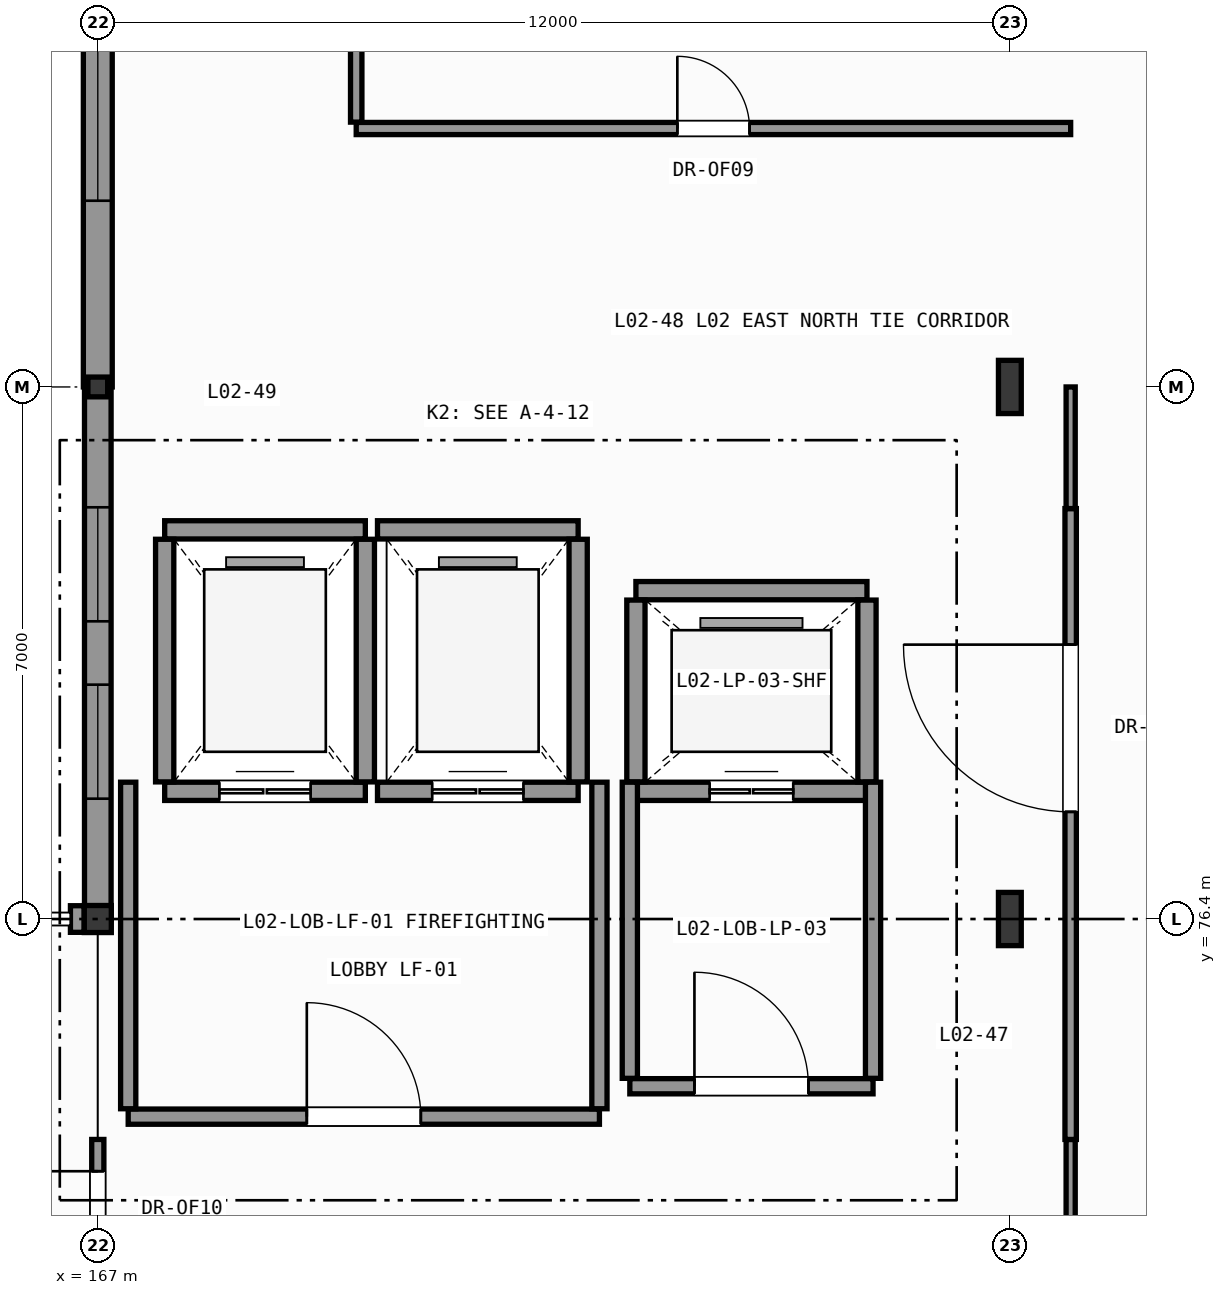
"""IFC4 building model, lengths in metres.
Left out: names, types, materials, properties, quantities, classifications, styles, units other than length and angle.
Written with IfcOpenShell. Run it as: python <this file> out.ifc"""

import sys

from ifc_helpers import new_model, si_unit, direction, frame, frame_2d, origin, origin_2d, place, context, subcontext, project, spatial, rectangle, hollow_rectangle, hollow_circle, i_section, extrude, element, fill, save


model = new_model("IFC4")
c1 = context("Model", 3, precision=1e-05, world=origin(), true_north=direction((0.0, 1.0)))
c2 = subcontext(c1, "Body", "Model", "MODEL_VIEW")
j1 = project(units=[si_unit("LENGTHUNIT", "METRE"), si_unit("PLANEANGLEUNIT", "RADIAN")], contexts=[c1])
p1 = place(None, origin())
s1 = spatial("IfcSite", under=j1, at=p1, CompositionType="ELEMENT")
p2 = place(p1, origin())
s2 = spatial("IfcBuilding", under=s1, at=p2, CompositionType="ELEMENT")
p3 = place(p2, frame((0.0, 0.0, 7.8)))
s3 = spatial("IfcBuildingStorey", under=s2, at=p3, CompositionType="ELEMENT", Elevation=7.8)
p4 = place(p3, frame((167.0, 76.4, 0.0), z_axis=(0.0, 0.0, 1.0), x_axis=(1.0, 0.0, 0.0)))
e1 = element("IfcColumn", 1, at=p4, inside=s3, PredefinedType="COLUMN", context=c2, shape_type="SweptSolid", body=[
    extrude(hollow_circle(Radius=0.178, WallThickness=0.016, at=origin_2d()), origin(), (0.0, 0.0, 1.0), 5.4),
])
p5 = place(p3, frame((167.0, 83.4, 0.0), z_axis=(0.0, 0.0, 1.0), x_axis=(1.0, 0.0, 0.0)))
e2 = element("IfcColumn", 2, at=p5, inside=s3, PredefinedType="COLUMN", context=c2, shape_type="SweptSolid", body=[
    extrude(hollow_rectangle(XDim=0.26, YDim=0.26, WallThickness=0.012, InnerFilletRadius=0.012, OuterFilletRadius=0.025, at=origin_2d()), origin(), (0.0, 0.0, 1.0), 5.4),
])
for number, where, z_axis, x_axis in (
    (3, (179.0, 76.4, 0.0), (0.0, 0.0, 1.0), (1.0, 0.0, 0.0)),
    (4, (179.0, 83.4, 0.0), (0.0, 0.0, 1.0), (1.0, 0.0, 0.0)),
):
    element("IfcColumn", number, at=place(p3, frame(where, z_axis=z_axis, x_axis=x_axis)), inside=s3, PredefinedType="COLUMN", context=c2, shape_type="SweptSolid", body=[
        extrude(i_section(OverallWidth=0.3, OverallDepth=0.7, WebThickness=0.017, FlangeThickness=0.032, FilletRadius=0.027, at=origin_2d()), origin(), (0.0, 0.0, 1.0), 5.4),
    ])
p6 = place(p3, frame((167.0, 83.4, 0.0), z_axis=(0.0, 0.0, 1.0), x_axis=(0.0, 1.0, 0.0)))
e5 = element("IfcWall", 5, at=p6, inside=s3, PredefinedType="SOLIDWALL", context=c2, shape_type="SweptSolid", body=[
    extrude(rectangle(XDim=7.0, YDim=0.38, at=frame_2d((3.5, 0.0))), origin(), (0.0, 0.0, 1.0), 4.815),
])
p7 = place(p6, frame((2.45, 0.0, 0.95)))
e6 = element("IfcOpeningElement", 6, at=p7, cuts=e5, PredefinedType="OPENING", context=c2, shape_type="SweptSolid", body=[
    extrude(rectangle(XDim=2.1, YDim=2.8, at=frame_2d((1.05, 1.4))), frame((0.0, 0.2, 0.0), z_axis=(0.0, -1.0, 0.0), x_axis=(1.0, 0.0, 0.0)), (0.0, 0.0, 1.0), 0.4),
])
p8 = place(p3, frame((167.0, 76.4, 0.0), z_axis=(0.0, 0.0, 1.0), x_axis=(0.0, 1.0, 0.0)))
e7 = element("IfcWall", 7, at=p8, inside=s3, PredefinedType="SOLIDWALL", context=c2, shape_type="SweptSolid", body=[
    extrude(rectangle(XDim=7.0, YDim=0.35, at=frame_2d((3.5, 0.0))), origin(), (0.0, 0.0, 1.0), 4.815),
])
p9 = place(p8, frame((1.583, 0.0, 0.95)))
e8 = element("IfcOpeningElement", 8, at=p9, cuts=e7, PredefinedType="OPENING", context=c2, shape_type="SweptSolid", body=[
    extrude(rectangle(XDim=1.5, YDim=2.4, at=frame_2d((0.75, 1.2))), frame((0.0, 0.185, 0.0), z_axis=(0.0, -1.0, 0.0), x_axis=(1.0, 0.0, 0.0)), (0.0, 0.0, 1.0), 0.37),
])
p10 = place(p8, frame((3.917, 0.0, 0.95)))
e9 = element("IfcOpeningElement", 9, at=p10, cuts=e7, PredefinedType="OPENING", context=c2, shape_type="SweptSolid", body=[
    extrude(rectangle(XDim=1.5, YDim=2.4, at=frame_2d((0.75, 1.2))), frame((0.0, 0.185, 0.0), z_axis=(0.0, -1.0, 0.0), x_axis=(1.0, 0.0, 0.0)), (0.0, 0.0, 1.0), 0.37),
])
p11 = place(p3, frame((166.821, 76.4, 0.0), z_axis=(0.0, 0.0, 1.0), x_axis=(-1.0, 0.0, 0.0)))
e10 = element("IfcWall", 10, at=p11, inside=s3, PredefinedType="SOLIDWALL", context=c2, shape_type="SweptSolid", body=[
    extrude(rectangle(XDim=0.181, YDim=0.35, at=frame_2d((0.091, 0.0))), origin(), (0.0, 0.0, 1.0), 5.15),
])
p12 = place(p3, frame((167.88, 78.08, 0.0), z_axis=(0.0, 0.0, 1.0), x_axis=(1.0, 0.0, 0.0)))
e11 = element("IfcWall", 11, at=p12, inside=s3, PredefinedType="SHEAR", context=c2, shape_type="SweptSolid", body=[
    extrude(rectangle(XDim=2.64, YDim=0.24, at=frame_2d((1.32, 0.0))), origin(), (0.0, 0.0, 1.0), 5.15),
])
p13 = place(p12, frame((0.72, 0.0, 0.0)))
e12 = element("IfcOpeningElement", 12, at=p13, cuts=e11, PredefinedType="OPENING", context=c2, shape_type="SweptSolid", body=[
    extrude(rectangle(XDim=1.2, YDim=2.2, at=frame_2d((0.6, 1.1))), frame((0.0, 0.13, 0.0), z_axis=(0.0, -1.0, 0.0), x_axis=(1.0, 0.0, 0.0)), (0.0, 0.0, 1.0), 0.26),
])
p14 = place(p3, frame((167.88, 81.52, 0.0), z_axis=(0.0, 0.0, 1.0), x_axis=(1.0, 0.0, 0.0)))
e13 = element("IfcWall", 13, at=p14, inside=s3, PredefinedType="SHEAR", context=c2, shape_type="SweptSolid", body=[
    extrude(rectangle(XDim=2.64, YDim=0.24, at=frame_2d((1.32, 0.0))), origin(), (0.0, 0.0, 1.0), 5.15),
])
for number, where, z_axis, x_axis in (
    (14, (167.88, 78.204, 0.0), (0.0, 0.0, 1.0), (0.0, 1.0, 0.0)),
    (15, (170.52, 78.204, 0.0), (0.0, 0.0, 1.0), (0.0, 1.0, 0.0)),
):
    element("IfcWall", number, at=place(p3, frame(where, z_axis=z_axis, x_axis=x_axis)), inside=s3, PredefinedType="SHEAR", context=c2, shape_type="SweptSolid", body=[
        extrude(rectangle(XDim=3.192, YDim=0.24, at=frame_2d((1.596, 0.0))), origin(), (0.0, 0.0, 1.0), 5.15),
    ])
p15 = place(p3, frame((170.68, 78.08, 0.0), z_axis=(0.0, 0.0, 1.0), x_axis=(1.0, 0.0, 0.0)))
e16 = element("IfcWall", 16, at=p15, inside=s3, PredefinedType="SHEAR", context=c2, shape_type="SweptSolid", body=[
    extrude(rectangle(XDim=2.64, YDim=0.24, at=frame_2d((1.32, 0.0))), origin(), (0.0, 0.0, 1.0), 5.15),
])
p16 = place(p15, frame((0.72, 0.0, 0.0)))
e17 = element("IfcOpeningElement", 17, at=p16, cuts=e16, PredefinedType="OPENING", context=c2, shape_type="SweptSolid", body=[
    extrude(rectangle(XDim=1.2, YDim=2.2, at=frame_2d((0.6, 1.1))), frame((0.0, 0.13, 0.0), z_axis=(0.0, -1.0, 0.0), x_axis=(1.0, 0.0, 0.0)), (0.0, 0.0, 1.0), 0.26),
])
p17 = place(p3, frame((170.68, 81.52, 0.0), z_axis=(0.0, 0.0, 1.0), x_axis=(1.0, 0.0, 0.0)))
e18 = element("IfcWall", 18, at=p17, inside=s3, PredefinedType="SHEAR", context=c2, shape_type="SweptSolid", body=[
    extrude(rectangle(XDim=2.64, YDim=0.24, at=frame_2d((1.32, 0.0))), origin(), (0.0, 0.0, 1.0), 5.15),
])
p18 = place(p3, frame((173.32, 78.204, 0.0), z_axis=(0.0, 0.0, 1.0), x_axis=(0.0, 1.0, 0.0)))
e19 = element("IfcWall", 19, at=p18, inside=s3, PredefinedType="SHEAR", context=c2, shape_type="SweptSolid", body=[
    extrude(rectangle(XDim=3.192, YDim=0.24, at=frame_2d((1.596, 0.0))), origin(), (0.0, 0.0, 1.0), 5.15),
])
p19 = place(p3, frame((174.08, 78.08, 0.0), z_axis=(0.0, 0.0, 1.0), x_axis=(1.0, 0.0, 0.0)))
e20 = element("IfcWall", 20, at=p19, inside=s3, PredefinedType="SHEAR", context=c2, shape_type="SweptSolid", body=[
    extrude(rectangle(XDim=3.04, YDim=0.24, at=frame_2d((1.52, 0.0))), origin(), (0.0, 0.0, 1.0), 5.15),
])
p20 = place(p19, frame((0.97, 0.0, 0.0)))
e21 = element("IfcOpeningElement", 21, at=p20, cuts=e20, PredefinedType="OPENING", context=c2, shape_type="SweptSolid", body=[
    extrude(rectangle(XDim=1.1, YDim=2.2, at=frame_2d((0.55, 1.1))), frame((0.0, 0.13, 0.0), z_axis=(0.0, -1.0, 0.0), x_axis=(1.0, 0.0, 0.0)), (0.0, 0.0, 1.0), 0.26),
])
p21 = place(p3, frame((174.08, 80.72, 0.0), z_axis=(0.0, 0.0, 1.0), x_axis=(1.0, 0.0, 0.0)))
e22 = element("IfcWall", 22, at=p21, inside=s3, PredefinedType="SHEAR", context=c2, shape_type="SweptSolid", body=[
    extrude(rectangle(XDim=3.04, YDim=0.24, at=frame_2d((1.52, 0.0))), origin(), (0.0, 0.0, 1.0), 5.15),
])
for number, where, z_axis, x_axis in (
    (23, (174.08, 78.204, 0.0), (0.0, 0.0, 1.0), (0.0, 1.0, 0.0)),
    (24, (177.12, 78.204, 0.0), (0.0, 0.0, 1.0), (0.0, 1.0, 0.0)),
):
    element("IfcWall", number, at=place(p3, frame(where, z_axis=z_axis, x_axis=x_axis)), inside=s3, PredefinedType="SHEAR", context=c2, shape_type="SweptSolid", body=[
        extrude(rectangle(XDim=2.392, YDim=0.24, at=frame_2d((1.196, 0.0))), origin(), (0.0, 0.0, 1.0), 5.15),
    ])
p22 = place(p3, frame((167.4, 73.8, 0.0), z_axis=(0.0, 0.0, 1.0), x_axis=(1.0, 0.0, 0.0)))
e25 = element("IfcWall", 25, at=p22, inside=s3, PredefinedType="PARTITIONING", context=c2, shape_type="SweptSolid", body=[
    extrude(rectangle(XDim=6.2, YDim=0.2, at=frame_2d((3.1, 0.0))), origin(), (0.0, 0.0, 1.0), 4.745),
])
p23 = place(p22, frame((2.35, 0.0, 0.0)))
e26 = element("IfcOpeningElement", 26, at=p23, cuts=e25, PredefinedType="OPENING", context=c2, shape_type="SweptSolid", body=[
    extrude(rectangle(XDim=1.5, YDim=2.2, at=frame_2d((0.75, 1.1))), frame((0.0, 0.11, 0.0), z_axis=(0.0, -1.0, 0.0), x_axis=(1.0, 0.0, 0.0)), (0.0, 0.0, 1.0), 0.22),
])
for number, where, z_axis, x_axis in (
    (27, (167.4, 73.904, 0.0), (0.0, 0.0, 1.0), (0.0, 1.0, 0.0)),
    (28, (173.6, 73.904, 0.0), (0.0, 0.0, 1.0), (0.0, 1.0, 0.0)),
):
    element("IfcWall", number, at=place(p3, frame(where, z_axis=z_axis, x_axis=x_axis)), inside=s3, PredefinedType="PARTITIONING", context=c2, shape_type="SweptSolid", body=[
        extrude(rectangle(XDim=4.296, YDim=0.2, at=frame_2d((2.148, 0.0))), origin(), (0.0, 0.0, 1.0), 5.15),
    ])
p24 = place(p3, frame((174.0, 74.2, 0.0), z_axis=(0.0, 0.0, 1.0), x_axis=(1.0, 0.0, 0.0)))
e29 = element("IfcWall", 29, at=p24, inside=s3, PredefinedType="PARTITIONING", context=c2, shape_type="SweptSolid", body=[
    extrude(rectangle(XDim=3.2, YDim=0.2, at=frame_2d((1.6, 0.0))), origin(), (0.0, 0.0, 1.0), 5.15),
])
p25 = place(p24, frame((0.85, 0.0, 0.0)))
e30 = element("IfcOpeningElement", 30, at=p25, cuts=e29, PredefinedType="OPENING", context=c2, shape_type="SweptSolid", body=[
    extrude(rectangle(XDim=1.5, YDim=2.2, at=frame_2d((0.75, 1.1))), frame((0.0, 0.11, 0.0), z_axis=(0.0, -1.0, 0.0), x_axis=(1.0, 0.0, 0.0)), (0.0, 0.0, 1.0), 0.22),
])
for number, where, z_axis, x_axis in (
    (31, (174.0, 74.304, 0.0), (0.0, 0.0, 1.0), (0.0, 1.0, 0.0)),
    (32, (177.2, 74.304, 0.0), (0.0, 0.0, 1.0), (0.0, 1.0, 0.0)),
):
    element("IfcWall", number, at=place(p3, frame(where, z_axis=z_axis, x_axis=x_axis)), inside=s3, PredefinedType="PARTITIONING", context=c2, shape_type="SweptSolid", body=[
        extrude(rectangle(XDim=3.896, YDim=0.2, at=frame_2d((1.948, 0.0))), origin(), (0.0, 0.0, 1.0), 5.15),
    ])
p26 = place(p3, frame((167.0, 71.664, 0.0), z_axis=(0.0, 0.0, 1.0), x_axis=(0.0, 1.0, 0.0)))
e33 = element("IfcWall", 33, at=p26, inside=s3, PredefinedType="PARTITIONING", context=c2, shape_type="SweptSolid", body=[
    extrude(rectangle(XDim=1.836, YDim=0.16, at=frame_2d((0.918, 0.0))), origin(), (0.0, 0.0, 1.0), 4.665),
])
p27 = place(p26, frame((0.418, 0.0, 0.0)))
e34 = element("IfcOpeningElement", 34, at=p27, cuts=e33, PredefinedType="OPENING", context=c2, shape_type="SweptSolid", body=[
    extrude(rectangle(XDim=1.0, YDim=2.15, at=frame_2d((0.5, 1.075))), frame((0.0, 0.09, 0.0), z_axis=(0.0, -1.0, 0.0), x_axis=(1.0, 0.0, 0.0)), (0.0, 0.0, 1.0), 0.18),
])
p28 = place(p3, frame((179.8, 70.1, 0.0), z_axis=(0.0, 0.0, 1.0), x_axis=(0.0, 1.0, 0.0)))
e35 = element("IfcWall", 35, at=p28, inside=s3, PredefinedType="PARTITIONING", context=c2, shape_type="SweptSolid", body=[
    extrude(rectangle(XDim=3.4, YDim=0.12, at=frame_2d((1.7, 0.0))), origin(), (0.0, 0.0, 1.0), 5.15),
])
p29 = place(p28, frame((1.2, 0.0, 0.0)))
e36 = element("IfcOpeningElement", 36, at=p29, cuts=e35, PredefinedType="OPENING", context=c2, shape_type="SweptSolid", body=[
    extrude(rectangle(XDim=1.0, YDim=2.15, at=frame_2d((0.5, 1.075))), frame((0.0, 0.07, 0.0), z_axis=(0.0, -1.0, 0.0), x_axis=(1.0, 0.0, 0.0)), (0.0, 0.0, 1.0), 0.14),
])
p30 = place(p3, frame((179.8, 73.5, 0.0), z_axis=(0.0, 0.0, 1.0), x_axis=(0.0, 1.0, 0.0)))
e37 = element("IfcWall", 37, at=p30, inside=s3, PredefinedType="PARTITIONING", context=c2, shape_type="SweptSolid", body=[
    extrude(rectangle(XDim=8.3, YDim=0.15, at=frame_2d((4.15, 0.0))), origin(), (0.0, 0.0, 1.0), 5.15),
])
p31 = place(p30, frame((4.31, 0.0, 0.0)))
e38 = element("IfcOpeningElement", 38, at=p31, cuts=e37, PredefinedType="OPENING", context=c2, shape_type="SweptSolid", body=[
    extrude(rectangle(XDim=2.2, YDim=2.6, at=frame_2d((1.1, 1.3))), frame((0.0, 0.085, 0.0), z_axis=(0.0, -1.0, 0.0), x_axis=(1.0, 0.0, 0.0)), (0.0, 0.0, 1.0), 0.17),
])
p32 = place(p3, frame((179.8, 81.8, 0.0), z_axis=(0.0, 0.0, 1.0), x_axis=(0.0, 1.0, 0.0)))
e39 = element("IfcWall", 39, at=p32, inside=s3, PredefinedType="PARTITIONING", context=c2, shape_type="SweptSolid", body=[
    extrude(rectangle(XDim=1.6, YDim=0.12, at=frame_2d((0.8, 0.0))), origin(), (0.0, 0.0, 1.0), 5.15),
])
p33 = place(p3, frame((170.4, 86.8, 0.0), z_axis=(0.0, 0.0, 1.0), x_axis=(1.0, 0.0, 0.0)))
e40 = element("IfcWall", 40, at=p33, inside=s3, PredefinedType="PARTITIONING", context=c2, shape_type="SweptSolid", body=[
    extrude(rectangle(XDim=9.4, YDim=0.16, at=frame_2d((4.7, 0.0))), origin(), (0.0, 0.0, 1.0), 4.805),
])
p34 = place(p33, frame((4.225, 0.0, 0.0)))
e41 = element("IfcOpeningElement", 41, at=p34, cuts=e40, PredefinedType="OPENING", context=c2, shape_type="SweptSolid", body=[
    extrude(rectangle(XDim=0.95, YDim=2.1, at=frame_2d((0.475, 1.05))), frame((0.0, 0.09, 0.0), z_axis=(0.0, -1.0, 0.0), x_axis=(1.0, 0.0, 0.0)), (0.0, 0.0, 1.0), 0.18),
])
p35 = place(p3, frame((170.4, 86.884, 0.0), z_axis=(0.0, 0.0, 1.0), x_axis=(0.0, 1.0, 0.0)))
e42 = element("IfcWall", 42, at=p35, inside=s3, PredefinedType="PARTITIONING", context=c2, shape_type="SweptSolid", body=[
    extrude(rectangle(XDim=26.316, YDim=0.15, at=frame_2d((13.158, 0.0))), origin(), (0.0, 0.0, 1.0), 5.15),
])
p36 = place(p35, frame((12.633, 0.0, 0.0)))
e43 = element("IfcOpeningElement", 43, at=p36, cuts=e42, PredefinedType="OPENING", context=c2, shape_type="SweptSolid", body=[
    extrude(rectangle(XDim=1.05, YDim=2.2, at=frame_2d((0.525, 1.1))), frame((0.0, 0.085, 0.0), z_axis=(0.0, -1.0, 0.0), x_axis=(1.0, 0.0, 0.0)), (0.0, 0.0, 1.0), 0.17),
])
p37 = place(p7, origin())
e44 = element("IfcWindow", 44, at=p37, inside=s3, PartitioningType="SINGLE_PANEL", PredefinedType="WINDOW", context=c2, shape_type="SweptSolid", body=[
    extrude(rectangle(XDim=2.1, YDim=2.8, at=frame_2d((1.05, 1.4))), frame((0.0, 0.03, 0.0), z_axis=(0.0, -1.0, 0.0), x_axis=(1.0, 0.0, 0.0)), (0.0, 0.0, 1.0), 0.06),
])
fill(e6, e44)
p38 = place(p9, origin())
e45 = element("IfcWindow", 45, at=p38, inside=s3, PartitioningType="SINGLE_PANEL", PredefinedType="WINDOW", context=c2, shape_type="SweptSolid", body=[
    extrude(rectangle(XDim=1.5, YDim=2.4, at=frame_2d((0.75, 1.2))), frame((0.0, 0.03, 0.0), z_axis=(0.0, -1.0, 0.0), x_axis=(1.0, 0.0, 0.0)), (0.0, 0.0, 1.0), 0.06),
])
fill(e8, e45)
p39 = place(p10, origin())
e46 = element("IfcWindow", 46, at=p39, inside=s3, PartitioningType="SINGLE_PANEL", PredefinedType="WINDOW", context=c2, shape_type="SweptSolid", body=[
    extrude(rectangle(XDim=1.5, YDim=2.4, at=frame_2d((0.75, 1.2))), frame((0.0, 0.03, 0.0), z_axis=(0.0, -1.0, 0.0), x_axis=(1.0, 0.0, 0.0)), (0.0, 0.0, 1.0), 0.06),
])
fill(e9, e46)
p40 = place(p13, origin())
e47 = element("IfcDoor", 47, at=p40, inside=s3, OperationType="DOUBLE_DOOR_SLIDING", PredefinedType="DOOR", context=c2, shape_type="SweptSolid", body=[
    extrude(rectangle(XDim=1.2, YDim=2.2, at=frame_2d((0.6, 1.1))), frame((0.0, 0.025, 0.0), z_axis=(0.0, -1.0, 0.0), x_axis=(1.0, 0.0, 0.0)), (0.0, 0.0, 1.0), 0.05),
])
fill(e12, e47)
p41 = place(p16, origin())
e48 = element("IfcDoor", 48, at=p41, inside=s3, OperationType="DOUBLE_DOOR_SLIDING", PredefinedType="DOOR", context=c2, shape_type="SweptSolid", body=[
    extrude(rectangle(XDim=1.2, YDim=2.2, at=frame_2d((0.6, 1.1))), frame((0.0, 0.025, 0.0), z_axis=(0.0, -1.0, 0.0), x_axis=(1.0, 0.0, 0.0)), (0.0, 0.0, 1.0), 0.05),
])
fill(e17, e48)
p42 = place(p20, origin())
e49 = element("IfcDoor", 49, at=p42, inside=s3, OperationType="DOUBLE_DOOR_SLIDING", PredefinedType="DOOR", context=c2, shape_type="SweptSolid", body=[
    extrude(rectangle(XDim=1.1, YDim=2.2, at=frame_2d((0.55, 1.1))), frame((0.0, 0.025, 0.0), z_axis=(0.0, -1.0, 0.0), x_axis=(1.0, 0.0, 0.0)), (0.0, 0.0, 1.0), 0.05),
])
fill(e21, e49)
p43 = place(p23, origin())
e50 = element("IfcDoor", 50, at=p43, inside=s3, OperationType="SINGLE_SWING_LEFT", PredefinedType="DOOR", context=c2, shape_type="SweptSolid", body=[
    extrude(rectangle(XDim=1.5, YDim=2.2, at=frame_2d((0.75, 1.1))), frame((0.0, 0.025, 0.0), z_axis=(0.0, -1.0, 0.0), x_axis=(1.0, 0.0, 0.0)), (0.0, 0.0, 1.0), 0.05),
])
fill(e26, e50)
p44 = place(p25, origin())
e51 = element("IfcDoor", 51, at=p44, inside=s3, OperationType="SINGLE_SWING_LEFT", PredefinedType="DOOR", context=c2, shape_type="SweptSolid", body=[
    extrude(rectangle(XDim=1.5, YDim=2.2, at=frame_2d((0.75, 1.1))), frame((0.0, 0.025, 0.0), z_axis=(0.0, -1.0, 0.0), x_axis=(1.0, 0.0, 0.0)), (0.0, 0.0, 1.0), 0.05),
])
fill(e30, e51)
p45 = place(p27, origin())
e52 = element("IfcDoor", 52, at=p45, inside=s3, OperationType="SINGLE_SWING_RIGHT", PredefinedType="DOOR", context=c2, shape_type="SweptSolid", body=[
    extrude(rectangle(XDim=1.0, YDim=2.15, at=frame_2d((0.5, 1.075))), frame((0.0, 0.025, 0.0), z_axis=(0.0, -1.0, 0.0), x_axis=(1.0, 0.0, 0.0)), (0.0, 0.0, 1.0), 0.05),
])
fill(e34, e52)
p46 = place(p31, origin())
e53 = element("IfcDoor", 53, at=p46, inside=s3, OperationType="SINGLE_SWING_RIGHT", PredefinedType="DOOR", context=c2, shape_type="SweptSolid", body=[
    extrude(rectangle(XDim=2.2, YDim=2.6, at=frame_2d((1.1, 1.3))), frame((0.0, 0.025, 0.0), z_axis=(0.0, -1.0, 0.0), x_axis=(1.0, 0.0, 0.0)), (0.0, 0.0, 1.0), 0.05),
])
fill(e38, e53)
p47 = place(p34, origin())
e54 = element("IfcDoor", 54, at=p47, inside=s3, OperationType="SINGLE_SWING_LEFT", PredefinedType="DOOR", context=c2, shape_type="SweptSolid", body=[
    extrude(rectangle(XDim=0.95, YDim=2.1, at=frame_2d((0.475, 1.05))), frame((0.0, 0.025, 0.0), z_axis=(0.0, -1.0, 0.0), x_axis=(1.0, 0.0, 0.0)), (0.0, 0.0, 1.0), 0.05),
])
fill(e41, e54)
save(model, sys.argv[1])
